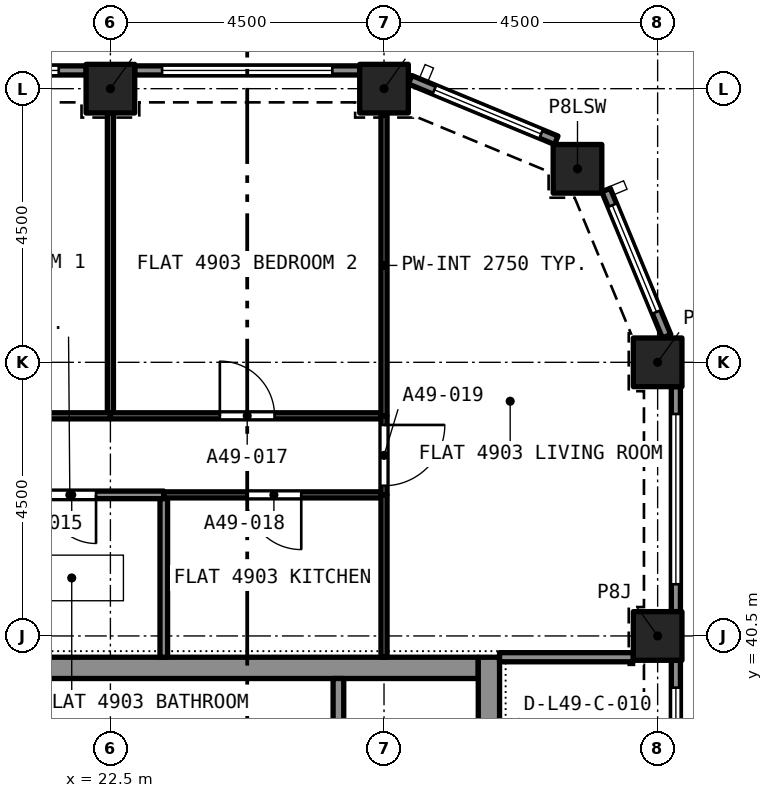
"""IFC4 building model, lengths in metres.
Left out: names, types, materials, properties, quantities, classifications, styles, units other than length and angle.
Written with IfcOpenShell. Run it as: python <this file> out.ifc"""

import sys

from ifc_helpers import new_model, si_unit, direction, frame, frame_2d, origin, origin_2d, place, context, subcontext, project, spatial, rectangle, extrude, element, fill, save


model = new_model("IFC4")
c1 = context("Model", 3, precision=1e-05, world=origin(), true_north=direction((0.0, 1.0)))
c2 = subcontext(c1, "Body", "Model", "MODEL_VIEW")
j1 = project(units=[si_unit("LENGTHUNIT", "METRE"), si_unit("PLANEANGLEUNIT", "RADIAN")], contexts=[c1])
p1 = place(None, origin())
s1 = spatial("IfcSite", under=j1, at=p1, CompositionType="ELEMENT")
p2 = place(p1, origin())
s2 = spatial("IfcBuilding", under=s1, at=p2, CompositionType="ELEMENT")
p3 = place(p2, frame((0.0, 0.0, 179.5)))
s3 = spatial("IfcBuildingStorey", under=s2, at=p3, CompositionType="ELEMENT", Elevation=179.5)
for number, where, z_axis, x_axis in (
    (1, (31.5, 40.5, 0.0), (0.0, 0.0, 1.0), (1.0, 0.0, 0.0)),
    (2, (31.5, 45.0, 0.0), (0.0, 0.0, 1.0), (1.0, 0.0, 0.0)),
    (3, (30.182, 48.182, 0.0), (0.0, 0.0, 1.0), (1.0, 0.0, 0.0)),
    (4, (22.5, 49.5, 0.0), (0.0, 0.0, 1.0), (1.0, 0.0, 0.0)),
    (5, (27.0, 49.5, 0.0), (0.0, 0.0, 1.0), (1.0, 0.0, 0.0)),
):
    element("IfcColumn", number, at=place(p3, frame(where, z_axis=z_axis, x_axis=x_axis)), inside=s3, PredefinedType="COLUMN", context=c2, shape_type="SweptSolid", body=[
        extrude(rectangle(XDim=0.8, YDim=0.8, at=origin_2d()), origin(), (0.0, 0.0, 1.0), 3.2),
    ])
p4 = place(p3, frame((20.95, 39.975, 0.0), z_axis=(0.0, 0.0, 1.0), x_axis=(1.0, 0.0, 0.0)))
e6 = element("IfcWall", 6, at=p4, inside=s3, PredefinedType="SOLIDWALL", context=c2, shape_type="SweptSolid", body=[
    extrude(rectangle(XDim=7.6, YDim=0.35, at=frame_2d((3.8, 0.0))), origin(), (0.0, 0.0, 1.0), 3.2),
])
p5 = place(p3, frame((28.725, 27.35, 0.0), z_axis=(0.0, 0.0, 1.0), x_axis=(0.0, 1.0, 0.0)))
e7 = element("IfcWall", 7, at=p5, inside=s3, PredefinedType="SOLIDWALL", context=c2, shape_type="SweptSolid", body=[
    extrude(rectangle(XDim=12.8, YDim=0.35, at=frame_2d((6.4, 0.0))), origin(), (0.0, 0.0, 1.0), 3.2),
])
p6 = place(p5, frame((8.6, 0.0, 0.0)))
e8 = element("IfcOpeningElement", 8, at=p6, cuts=e7, PredefinedType="OPENING", context=c2, shape_type="SweptSolid", body=[
    extrude(rectangle(XDim=1.2, YDim=2.1, at=frame_2d((0.6, 1.05))), frame((0.0, 0.185, 0.0), z_axis=(0.0, -1.0, 0.0), x_axis=(1.0, 0.0, 0.0)), (0.0, 0.0, 1.0), 0.37),
])
p7 = place(p3, frame((31.8, 40.1, 0.0), z_axis=(0.0, 0.0, 1.0), x_axis=(0.0, -1.0, 0.0)))
e9 = element("IfcWall", 9, at=p7, inside=s3, PredefinedType="SOLIDWALL", context=c2, shape_type="SweptSolid", body=[
    extrude(rectangle(XDim=3.7, YDim=0.15, at=frame_2d((1.85, 0.0))), origin(), (0.0, 0.0, 1.0), 3.2),
])
p8 = place(p7, frame((0.45, 0.0, 0.45)))
e10 = element("IfcOpeningElement", 10, at=p8, cuts=e9, PredefinedType="OPENING", context=c2, shape_type="SweptSolid", body=[
    extrude(rectangle(XDim=2.8, YDim=1.95, at=frame_2d((1.4, 0.975))), frame((0.0, 0.085, 0.0), z_axis=(0.0, -1.0, 0.0), x_axis=(1.0, 0.0, 0.0)), (0.0, 0.0, 1.0), 0.17),
])
p9 = place(p3, frame((31.8, 44.6, 0.0), z_axis=(0.0, 0.0, 1.0), x_axis=(0.0, -1.0, 0.0)))
e11 = element("IfcWall", 11, at=p9, inside=s3, PredefinedType="SOLIDWALL", context=c2, shape_type="SweptSolid", body=[
    extrude(rectangle(XDim=3.7, YDim=0.15, at=frame_2d((1.85, 0.0))), origin(), (0.0, 0.0, 1.0), 3.2),
])
p10 = place(p9, frame((0.45, 0.0, 0.45)))
e12 = element("IfcOpeningElement", 12, at=p10, cuts=e11, PredefinedType="OPENING", context=c2, shape_type="SweptSolid", body=[
    extrude(rectangle(XDim=2.8, YDim=1.95, at=frame_2d((1.4, 0.975))), frame((0.0, 0.085, 0.0), z_axis=(0.0, -1.0, 0.0), x_axis=(1.0, 0.0, 0.0)), (0.0, 0.0, 1.0), 0.17),
])
p11 = place(p3, frame((30.651, 47.833, 0.0), z_axis=(0.0, 0.0, 1.0), x_axis=(0.382669406082, -0.923885342263, 0.0)))
e13 = element("IfcWall", 13, at=p11, inside=s3, PredefinedType="SOLIDWALL", context=c2, shape_type="SweptSolid", body=[
    extrude(rectangle(XDim=2.602, YDim=0.15, at=frame_2d((1.301, 0.0))), origin(), (0.0, 0.0, 1.0), 3.2),
])
p12 = place(p11, frame((0.27, 0.0, 0.45)))
e14 = element("IfcOpeningElement", 14, at=p12, cuts=e13, PredefinedType="OPENING", context=c2, shape_type="SweptSolid", body=[
    extrude(rectangle(XDim=1.9, YDim=1.95, at=frame_2d((0.95, 0.975))), frame((0.0, 0.085, 0.0), z_axis=(0.0, -1.0, 0.0), x_axis=(1.0, 0.0, 0.0)), (0.0, 0.0, 1.0), 0.17),
])
p13 = place(p3, frame((27.429, 49.647, 0.0), z_axis=(0.0, 0.0, 1.0), x_axis=(0.923885342263, -0.382669406082, 0.0)))
e15 = element("IfcWall", 15, at=p13, inside=s3, PredefinedType="SOLIDWALL", context=c2, shape_type="SweptSolid", body=[
    extrude(rectangle(XDim=2.602, YDim=0.15, at=frame_2d((1.301, 0.0))), origin(), (0.0, 0.0, 1.0), 3.2),
])
p14 = place(p13, frame((0.432, 0.0, 0.45)))
e16 = element("IfcOpeningElement", 16, at=p14, cuts=e15, PredefinedType="OPENING", context=c2, shape_type="SweptSolid", body=[
    extrude(rectangle(XDim=1.9, YDim=1.95, at=frame_2d((0.95, 0.975))), frame((0.0, 0.085, 0.0), z_axis=(0.0, -1.0, 0.0), x_axis=(1.0, 0.0, 0.0)), (0.0, 0.0, 1.0), 0.17),
])
p15 = place(p3, frame((22.9, 49.8, 0.0), z_axis=(0.0, 0.0, 1.0), x_axis=(1.0, 0.0, 0.0)))
e17 = element("IfcWall", 17, at=p15, inside=s3, PredefinedType="SOLIDWALL", context=c2, shape_type="SweptSolid", body=[
    extrude(rectangle(XDim=3.7, YDim=0.15, at=frame_2d((1.85, 0.0))), origin(), (0.0, 0.0, 1.0), 3.2),
])
p16 = place(p15, frame((0.45, 0.0, 0.45)))
e18 = element("IfcOpeningElement", 18, at=p16, cuts=e17, PredefinedType="OPENING", context=c2, shape_type="SweptSolid", body=[
    extrude(rectangle(XDim=2.8, YDim=1.95, at=frame_2d((1.4, 0.975))), frame((0.0, 0.085, 0.0), z_axis=(0.0, -1.0, 0.0), x_axis=(1.0, 0.0, 0.0)), (0.0, 0.0, 1.0), 0.17),
])
p17 = place(p3, frame((18.4, 49.8, 0.0), z_axis=(0.0, 0.0, 1.0), x_axis=(1.0, 0.0, 0.0)))
e19 = element("IfcWall", 19, at=p17, inside=s3, PredefinedType="SOLIDWALL", context=c2, shape_type="SweptSolid", body=[
    extrude(rectangle(XDim=3.7, YDim=0.15, at=frame_2d((1.85, 0.0))), origin(), (0.0, 0.0, 1.0), 3.2),
])
p18 = place(p17, frame((0.45, 0.0, 0.45)))
e20 = element("IfcOpeningElement", 20, at=p18, cuts=e19, PredefinedType="OPENING", context=c2, shape_type="SweptSolid", body=[
    extrude(rectangle(XDim=2.8, YDim=1.95, at=frame_2d((1.4, 0.975))), frame((0.0, 0.085, 0.0), z_axis=(0.0, -1.0, 0.0), x_axis=(1.0, 0.0, 0.0)), (0.0, 0.0, 1.0), 0.17),
])
p19 = place(p3, frame((23.378, 42.82, 0.0), z_axis=(0.0, 0.0, 1.0), x_axis=(-1.0, 0.0, 0.0)))
e21 = element("IfcWall", 21, at=p19, inside=s3, PredefinedType="PARTITIONING", context=c2, shape_type="SweptSolid", body=[
    extrude(rectangle(XDim=3.09, YDim=0.125, at=frame_2d((1.545, 0.0))), origin(), (0.0, 0.0, 1.0), 2.75),
])
p20 = place(p19, frame((1.114, 0.0, 0.0)))
e22 = element("IfcOpeningElement", 22, at=p20, cuts=e21, PredefinedType="OPENING", context=c2, shape_type="SweptSolid", body=[
    extrude(rectangle(XDim=0.8, YDim=2.1, at=frame_2d((0.4, 1.05))), frame((0.0, 0.073, 0.0), z_axis=(0.0, -1.0, 0.0), x_axis=(1.0, 0.0, 0.0)), (0.0, 0.0, 1.0), 0.145),
])
p21 = place(p3, frame((23.378, 40.15, 0.0), z_axis=(0.0, 0.0, 1.0), x_axis=(0.0, 1.0, 0.0)))
e23 = element("IfcWall", 23, at=p21, inside=s3, PredefinedType="PARTITIONING", context=c2, shape_type="SweptSolid", body=[
    extrude(rectangle(XDim=2.608, YDim=0.125, at=frame_2d((1.304, 0.0))), origin(), (0.0, 0.0, 1.0), 2.75),
])
p22 = place(p3, frame((22.5, 44.17, 0.0), z_axis=(0.0, 0.0, 1.0), x_axis=(0.0, 1.0, 0.0)))
e24 = element("IfcWall", 24, at=p22, inside=s3, PredefinedType="PARTITIONING", context=c2, shape_type="SweptSolid", body=[
    extrude(rectangle(XDim=4.93, YDim=0.1, at=frame_2d((2.465, 0.0))), origin(), (0.0, 0.0, 1.0), 2.75),
])
p23 = place(p3, frame((18.1, 44.12, 0.0), z_axis=(0.0, 0.0, 1.0), x_axis=(1.0, 0.0, 0.0)))
e25 = element("IfcWall", 25, at=p23, inside=s3, PredefinedType="PARTITIONING", context=c2, shape_type="SweptSolid", body=[
    extrude(rectangle(XDim=4.4, YDim=0.1, at=frame_2d((2.2, 0.0))), origin(), (0.0, 0.0, 1.0), 2.75),
])
p24 = place(p23, frame((1.7, 0.0, 0.0)))
e26 = element("IfcOpeningElement", 26, at=p24, cuts=e25, PredefinedType="OPENING", context=c2, shape_type="SweptSolid", body=[
    extrude(rectangle(XDim=0.9, YDim=2.1, at=frame_2d((0.45, 1.05))), frame((0.0, 0.06, 0.0), z_axis=(0.0, -1.0, 0.0), x_axis=(1.0, 0.0, 0.0)), (0.0, 0.0, 1.0), 0.12),
])
p25 = place(p3, frame((22.5, 44.12, 0.0), z_axis=(0.0, 0.0, 1.0), x_axis=(1.0, 0.0, 0.0)))
e27 = element("IfcWall", 27, at=p25, inside=s3, PredefinedType="PARTITIONING", context=c2, shape_type="SweptSolid", body=[
    extrude(rectangle(XDim=4.45, YDim=0.1, at=frame_2d((2.225, 0.0))), origin(), (0.0, 0.0, 1.0), 2.75),
])
p26 = place(p25, frame((1.8, 0.0, 0.0)))
e28 = element("IfcOpeningElement", 28, at=p26, cuts=e27, PredefinedType="OPENING", context=c2, shape_type="SweptSolid", body=[
    extrude(rectangle(XDim=0.9, YDim=2.1, at=frame_2d((0.45, 1.05))), frame((0.0, 0.06, 0.0), z_axis=(0.0, -1.0, 0.0), x_axis=(1.0, 0.0, 0.0)), (0.0, 0.0, 1.0), 0.12),
])
p27 = place(p3, frame((27.0, 44.12, 0.0), z_axis=(0.0, 0.0, 1.0), x_axis=(0.0, 1.0, 0.0)))
e29 = element("IfcWall", 29, at=p27, inside=s3, PredefinedType="PARTITIONING", context=c2, shape_type="SweptSolid", body=[
    extrude(rectangle(XDim=4.947, YDim=0.1, at=frame_2d((2.474, 0.0))), origin(), (0.0, 0.0, 1.0), 2.75),
])
p28 = place(p3, frame((26.95, 42.82, 0.0), z_axis=(0.0, 0.0, 1.0), x_axis=(-1.0, 0.0, 0.0)))
e30 = element("IfcWall", 30, at=p28, inside=s3, PredefinedType="PARTITIONING", context=c2, shape_type="SweptSolid", body=[
    extrude(rectangle(XDim=3.572, YDim=0.1, at=frame_2d((1.786, 0.0))), origin(), (0.0, 0.0, 1.0), 2.75),
])
p29 = place(p28, frame((1.311, 0.0, 0.0)))
e31 = element("IfcOpeningElement", 31, at=p29, cuts=e30, PredefinedType="OPENING", context=c2, shape_type="SweptSolid", body=[
    extrude(rectangle(XDim=0.9, YDim=2.1, at=frame_2d((0.45, 1.05))), frame((0.0, 0.06, 0.0), z_axis=(0.0, -1.0, 0.0), x_axis=(1.0, 0.0, 0.0)), (0.0, 0.0, 1.0), 0.12),
])
p30 = place(p3, frame((27.0, 44.12, 0.0), z_axis=(0.0, 0.0, 1.0), x_axis=(0.0, -1.0, 0.0)))
e32 = element("IfcWall", 32, at=p30, inside=s3, PredefinedType="PARTITIONING", context=c2, shape_type="SweptSolid", body=[
    extrude(rectangle(XDim=1.3, YDim=0.1, at=frame_2d((0.65, 0.0))), origin(), (0.0, 0.0, 1.0), 2.75),
])
p31 = place(p30, frame((0.15, 0.0, 0.0)))
e33 = element("IfcOpeningElement", 33, at=p31, cuts=e32, PredefinedType="OPENING", context=c2, shape_type="SweptSolid", body=[
    extrude(rectangle(XDim=1.0, YDim=2.1, at=frame_2d((0.5, 1.05))), frame((0.0, 0.06, 0.0), z_axis=(0.0, -1.0, 0.0), x_axis=(1.0, 0.0, 0.0)), (0.0, 0.0, 1.0), 0.12),
])
p32 = place(p3, frame((27.0, 40.15, 0.0), z_axis=(0.0, 0.0, 1.0), x_axis=(0.0, 1.0, 0.0)))
e34 = element("IfcWall", 34, at=p32, inside=s3, PredefinedType="PARTITIONING", context=c2, shape_type="SweptSolid", body=[
    extrude(rectangle(XDim=2.67, YDim=0.1, at=frame_2d((1.335, 0.0))), origin(), (0.0, 0.0, 1.0), 2.75),
])
p33 = place(p3, frame((28.9, 40.15, 0.0), z_axis=(0.0, 0.0, 1.0), x_axis=(1.0, 0.0, 0.0)))
e35 = element("IfcWall", 35, at=p33, inside=s3, PredefinedType="PARTITIONING", context=c2, shape_type="SweptSolid", body=[
    extrude(rectangle(XDim=2.2, YDim=0.15, at=frame_2d((1.1, 0.0))), origin(), (0.0, 0.0, 1.0), 2.75),
])
p34 = place(p3, frame((26.25, 37.5, 0.0), z_axis=(0.0, 0.0, 1.0), x_axis=(0.0, 1.0, 0.0)))
e36 = element("IfcWall", 36, at=p34, inside=s3, PredefinedType="SOLIDWALL", context=c2, shape_type="SweptSolid", body=[
    extrude(rectangle(XDim=2.3, YDim=0.175, at=frame_2d((1.15, 0.0))), origin(), (0.0, 0.0, 1.0), 2.9),
])
p35 = place(p8, origin())
e37 = element("IfcWindow", 37, at=p35, inside=s3, PartitioningType="SINGLE_PANEL", PredefinedType="WINDOW", context=c2, shape_type="SweptSolid", body=[
    extrude(rectangle(XDim=2.8, YDim=1.95, at=frame_2d((1.4, 0.975))), frame((0.0, 0.03, 0.0), z_axis=(0.0, -1.0, 0.0), x_axis=(1.0, 0.0, 0.0)), (0.0, 0.0, 1.0), 0.06),
])
fill(e10, e37)
p36 = place(p10, origin())
e38 = element("IfcWindow", 38, at=p36, inside=s3, PartitioningType="SINGLE_PANEL", PredefinedType="WINDOW", context=c2, shape_type="SweptSolid", body=[
    extrude(rectangle(XDim=2.8, YDim=1.95, at=frame_2d((1.4, 0.975))), frame((0.0, 0.03, 0.0), z_axis=(0.0, -1.0, 0.0), x_axis=(1.0, 0.0, 0.0)), (0.0, 0.0, 1.0), 0.06),
])
fill(e12, e38)
p37 = place(p12, origin())
e39 = element("IfcWindow", 39, at=p37, inside=s3, PartitioningType="SINGLE_PANEL", PredefinedType="WINDOW", context=c2, shape_type="SweptSolid", body=[
    extrude(rectangle(XDim=1.9, YDim=1.95, at=frame_2d((0.95, 0.975))), frame((0.0, 0.03, 0.0), z_axis=(0.0, -1.0, 0.0), x_axis=(1.0, 0.0, 0.0)), (0.0, 0.0, 1.0), 0.06),
])
fill(e14, e39)
p38 = place(p14, origin())
e40 = element("IfcWindow", 40, at=p38, inside=s3, PartitioningType="SINGLE_PANEL", PredefinedType="WINDOW", context=c2, shape_type="SweptSolid", body=[
    extrude(rectangle(XDim=1.9, YDim=1.95, at=frame_2d((0.95, 0.975))), frame((0.0, 0.03, 0.0), z_axis=(0.0, -1.0, 0.0), x_axis=(1.0, 0.0, 0.0)), (0.0, 0.0, 1.0), 0.06),
])
fill(e16, e40)
p39 = place(p16, origin())
e41 = element("IfcWindow", 41, at=p39, inside=s3, PartitioningType="SINGLE_PANEL", PredefinedType="WINDOW", context=c2, shape_type="SweptSolid", body=[
    extrude(rectangle(XDim=2.8, YDim=1.95, at=frame_2d((1.4, 0.975))), frame((0.0, 0.03, 0.0), z_axis=(0.0, -1.0, 0.0), x_axis=(1.0, 0.0, 0.0)), (0.0, 0.0, 1.0), 0.06),
])
fill(e18, e41)
p40 = place(p18, origin())
e42 = element("IfcWindow", 42, at=p40, inside=s3, PartitioningType="SINGLE_PANEL", PredefinedType="WINDOW", context=c2, shape_type="SweptSolid", body=[
    extrude(rectangle(XDim=2.8, YDim=1.95, at=frame_2d((1.4, 0.975))), frame((0.0, 0.03, 0.0), z_axis=(0.0, -1.0, 0.0), x_axis=(1.0, 0.0, 0.0)), (0.0, 0.0, 1.0), 0.06),
])
fill(e20, e42)
p41 = place(p20, origin())
e43 = element("IfcDoor", 43, at=p41, inside=s3, OperationType="SINGLE_SWING_LEFT", PredefinedType="DOOR", context=c2, shape_type="SweptSolid", body=[
    extrude(rectangle(XDim=0.8, YDim=2.1, at=frame_2d((0.4, 1.05))), frame((0.0, 0.025, 0.0), z_axis=(0.0, -1.0, 0.0), x_axis=(1.0, 0.0, 0.0)), (0.0, 0.0, 1.0), 0.05),
])
fill(e22, e43)
p42 = place(p26, origin())
e44 = element("IfcDoor", 44, at=p42, inside=s3, OperationType="SINGLE_SWING_RIGHT", PredefinedType="DOOR", context=c2, shape_type="SweptSolid", body=[
    extrude(rectangle(XDim=0.9, YDim=2.1, at=frame_2d((0.45, 1.05))), frame((0.0, 0.025, 0.0), z_axis=(0.0, -1.0, 0.0), x_axis=(1.0, 0.0, 0.0)), (0.0, 0.0, 1.0), 0.05),
])
fill(e28, e44)
p43 = place(p29, origin())
e45 = element("IfcDoor", 45, at=p43, inside=s3, OperationType="SINGLE_SWING_LEFT", PredefinedType="DOOR", context=c2, shape_type="SweptSolid", body=[
    extrude(rectangle(XDim=0.9, YDim=2.1, at=frame_2d((0.45, 1.05))), frame((0.0, 0.025, 0.0), z_axis=(0.0, -1.0, 0.0), x_axis=(1.0, 0.0, 0.0)), (0.0, 0.0, 1.0), 0.05),
])
fill(e31, e45)
p44 = place(p31, origin())
e46 = element("IfcDoor", 46, at=p44, inside=s3, OperationType="SINGLE_SWING_RIGHT", PredefinedType="DOOR", context=c2, shape_type="SweptSolid", body=[
    extrude(rectangle(XDim=1.0, YDim=2.1, at=frame_2d((0.5, 1.05))), frame((0.0, 0.025, 0.0), z_axis=(0.0, -1.0, 0.0), x_axis=(1.0, 0.0, 0.0)), (0.0, 0.0, 1.0), 0.05),
])
fill(e33, e46)
save(model, sys.argv[1])
